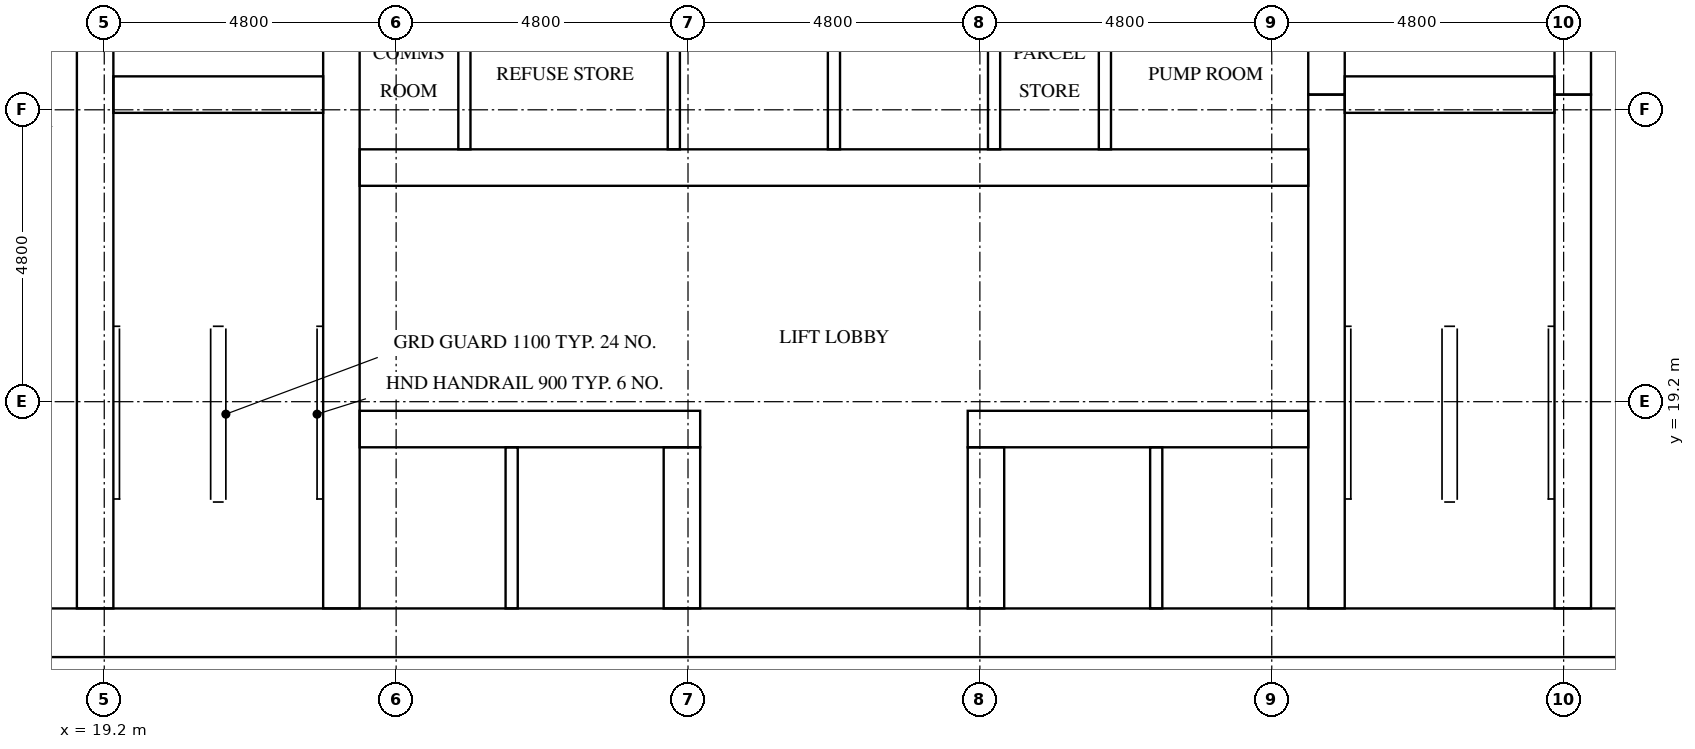
"""IFC4 building model, lengths in metres.
Left out: names, types, materials, properties, quantities, classifications, styles, units other than length and angle.
Written with IfcOpenShell. Run it as: python <this file> out.ifc"""

import sys

from ifc_helpers import new_model, si_unit, direction, frame, frame_2d, origin, place, context, subcontext, project, spatial, rectangle, extrude, element, fill, save


model = new_model("IFC4")
c1 = context("Model", 3, precision=1e-05, world=origin(), true_north=direction((0.0, 1.0)))
c2 = subcontext(c1, "Body", "Model", "MODEL_VIEW")
j1 = project(units=[si_unit("LENGTHUNIT", "METRE"), si_unit("PLANEANGLEUNIT", "RADIAN")], contexts=[c1])
p1 = place(None, origin())
s1 = spatial("IfcSite", under=j1, at=p1, CompositionType="ELEMENT")
p2 = place(p1, origin())
s2 = spatial("IfcBuilding", under=s1, at=p2, CompositionType="ELEMENT")
p3 = place(p2, frame((0.0, 0.0, 133.1)))
s3 = spatial("IfcBuildingStorey", under=s2, at=p3, CompositionType="ELEMENT", Elevation=133.1)
p4 = place(p3, frame((15.0, 15.4, 0.0), z_axis=(0.0, 0.0, 1.0), x_axis=(1.0, 0.0, 0.0)))
e1 = element("IfcWall", 1, at=p4, inside=s3, PredefinedType="SHEAR", context=c2, shape_type="SweptSolid", body=[
    extrude(rectangle(XDim=32.4, YDim=0.8, at=frame_2d((16.2, 0.0))), origin(), (0.0, 0.0, 1.0), 3.2),
])
p5 = place(p4, frame((15.3, 0.0, 0.0)))
e2 = element("IfcOpeningElement", 2, at=p5, cuts=e1, PredefinedType="OPENING", context=c2, shape_type="SweptSolid", body=[
    extrude(rectangle(XDim=1.8, YDim=2.1, at=frame_2d((0.9, 1.05))), frame((0.0, 0.41, 0.0), z_axis=(0.0, -1.0, 0.0), x_axis=(1.0, 0.0, 0.0)), (0.0, 0.0, 1.0), 0.82),
])
p6 = place(p3, frame((19.05, 15.8, 0.0), z_axis=(0.0, 0.0, 1.0), x_axis=(0.0, 1.0, 0.0)))
e3 = element("IfcWall", 3, at=p6, inside=s3, PredefinedType="SHEAR", context=c2, shape_type="SweptSolid", body=[
    extrude(rectangle(XDim=15.15, YDim=0.6, at=frame_2d((7.575, 0.0))), origin(), (0.0, 0.0, 1.0), 3.2),
])
p7 = place(p6, frame((9.65, 0.0, 0.0)))
e4 = element("IfcOpeningElement", 4, at=p7, cuts=e3, PredefinedType="OPENING", context=c2, shape_type="SweptSolid", body=[
    extrude(rectangle(XDim=1.1, YDim=2.1, at=frame_2d((0.55, 1.05))), frame((0.0, 0.31, 0.0), z_axis=(0.0, -1.0, 0.0), x_axis=(1.0, 0.0, 0.0)), (0.0, 0.0, 1.0), 0.62),
])
p8 = place(p6, frame((13.15, 0.0, 0.0)))
e5 = element("IfcOpeningElement", 5, at=p8, cuts=e3, PredefinedType="OPENING", context=c2, shape_type="SweptSolid", body=[
    extrude(rectangle(XDim=1.1, YDim=2.1, at=frame_2d((0.55, 1.05))), frame((0.0, 0.31, 0.0), z_axis=(0.0, -1.0, 0.0), x_axis=(1.0, 0.0, 0.0)), (0.0, 0.0, 1.0), 0.62),
])
p9 = place(p6, frame((0.4, 0.0, 0.0)))
e6 = element("IfcOpeningElement", 6, at=p9, cuts=e3, PredefinedType="OPENING", context=c2, shape_type="SweptSolid", body=[
    extrude(rectangle(XDim=1.2, YDim=2.1, at=frame_2d((0.6, 1.05))), frame((0.0, 0.31, 0.0), z_axis=(0.0, -1.0, 0.0), x_axis=(1.0, 0.0, 0.0)), (0.0, 0.0, 1.0), 0.62),
])
p10 = place(p3, frame((23.1, 15.8, 0.0), z_axis=(0.0, 0.0, 1.0), x_axis=(0.0, 1.0, 0.0)))
e7 = element("IfcWall", 7, at=p10, inside=s3, PredefinedType="SHEAR", context=c2, shape_type="SweptSolid", body=[
    extrude(rectangle(XDim=21.2, YDim=0.6, at=frame_2d((10.6, 0.0))), origin(), (0.0, 0.0, 1.0), 3.2),
])
p11 = place(p3, frame((39.3, 15.8, 0.0), z_axis=(0.0, 0.0, 1.0), x_axis=(0.0, 1.0, 0.0)))
e8 = element("IfcWall", 8, at=p11, inside=s3, PredefinedType="SHEAR", context=c2, shape_type="SweptSolid", body=[
    extrude(rectangle(XDim=8.45, YDim=0.6, at=frame_2d((4.225, 0.0))), origin(), (0.0, 0.0, 1.0), 3.2),
])
p12 = place(p3, frame((39.3, 24.25, 0.0), z_axis=(0.0, 0.0, 1.0), x_axis=(0.0, 1.0, 0.0)))
e9 = element("IfcWall", 9, at=p12, inside=s3, PredefinedType="SHEAR", context=c2, shape_type="SweptSolid", body=[
    extrude(rectangle(XDim=3.5, YDim=0.6, at=frame_2d((1.75, 0.0))), origin(), (0.0, 0.0, 1.0), 3.2),
])
p13 = place(p3, frame((43.35, 15.8, 0.0), z_axis=(0.0, 0.0, 1.0), x_axis=(0.0, 1.0, 0.0)))
e10 = element("IfcWall", 10, at=p13, inside=s3, PredefinedType="SHEAR", context=c2, shape_type="SweptSolid", body=[
    extrude(rectangle(XDim=8.45, YDim=0.6, at=frame_2d((4.225, 0.0))), origin(), (0.0, 0.0, 1.0), 3.2),
])
p14 = place(p13, frame((0.4, 0.0, 0.0)))
e11 = element("IfcOpeningElement", 11, at=p14, cuts=e10, PredefinedType="OPENING", context=c2, shape_type="SweptSolid", body=[
    extrude(rectangle(XDim=1.2, YDim=2.1, at=frame_2d((0.6, 1.05))), frame((0.0, 0.31, 0.0), z_axis=(0.0, -1.0, 0.0), x_axis=(1.0, 0.0, 0.0)), (0.0, 0.0, 1.0), 0.62),
])
p15 = place(p3, frame((43.35, 24.25, 0.0), z_axis=(0.0, 0.0, 1.0), x_axis=(0.0, 1.0, 0.0)))
e12 = element("IfcWall", 12, at=p15, inside=s3, PredefinedType="SHEAR", context=c2, shape_type="SweptSolid", body=[
    extrude(rectangle(XDim=3.5, YDim=0.6, at=frame_2d((1.75, 0.0))), origin(), (0.0, 0.0, 1.0), 3.2),
])
p16 = place(p15, frame((1.2, 0.0, 0.0)))
e13 = element("IfcOpeningElement", 13, at=p16, cuts=e12, PredefinedType="OPENING", context=c2, shape_type="SweptSolid", body=[
    extrude(rectangle(XDim=1.1, YDim=2.1, at=frame_2d((0.55, 1.05))), frame((0.0, 0.31, 0.0), z_axis=(0.0, -1.0, 0.0), x_axis=(1.0, 0.0, 0.0)), (0.0, 0.0, 1.0), 0.62),
])
for number, where, z_axis, x_axis in (
    (14, (19.35, 24.25, 0.0), (0.0, 0.0, 1.0), (1.0, 0.0, 0.0)),
    (15, (39.6, 24.25, 0.0), (0.0, 0.0, 1.0), (1.0, 0.0, 0.0)),
):
    element("IfcWall", number, at=place(p3, frame(where, z_axis=z_axis, x_axis=x_axis)), inside=s3, PredefinedType="SHEAR", context=c2, shape_type="SweptSolid", body=[
        extrude(rectangle(XDim=3.45, YDim=0.6, at=frame_2d((1.725, 0.0))), origin(), (0.0, 0.0, 1.0), 3.2),
    ])
p17 = place(p3, frame((23.4, 18.75, 0.0), z_axis=(0.0, 0.0, 1.0), x_axis=(1.0, 0.0, 0.0)))
e16 = element("IfcWall", 16, at=p17, inside=s3, PredefinedType="SHEAR", context=c2, shape_type="SweptSolid", body=[
    extrude(rectangle(XDim=5.6, YDim=0.6, at=frame_2d((2.8, 0.0))), origin(), (0.0, 0.0, 1.0), 3.2),
])
p18 = place(p17, frame((0.65, 0.0, 0.0)))
e17 = element("IfcOpeningElement", 17, at=p18, cuts=e16, PredefinedType="OPENING", context=c2, shape_type="SweptSolid", body=[
    extrude(rectangle(XDim=1.1, YDim=2.1, at=frame_2d((0.55, 1.05))), frame((0.0, 0.31, 0.0), z_axis=(0.0, -1.0, 0.0), x_axis=(1.0, 0.0, 0.0)), (0.0, 0.0, 1.0), 0.62),
])
p19 = place(p17, frame((3.25, 0.0, 0.0)))
e18 = element("IfcOpeningElement", 18, at=p19, cuts=e16, PredefinedType="OPENING", context=c2, shape_type="SweptSolid", body=[
    extrude(rectangle(XDim=1.1, YDim=2.1, at=frame_2d((0.55, 1.05))), frame((0.0, 0.31, 0.0), z_axis=(0.0, -1.0, 0.0), x_axis=(1.0, 0.0, 0.0)), (0.0, 0.0, 1.0), 0.62),
])
p20 = place(p3, frame((33.4, 18.75, 0.0), z_axis=(0.0, 0.0, 1.0), x_axis=(1.0, 0.0, 0.0)))
e19 = element("IfcWall", 19, at=p20, inside=s3, PredefinedType="SHEAR", context=c2, shape_type="SweptSolid", body=[
    extrude(rectangle(XDim=5.6, YDim=0.6, at=frame_2d((2.8, 0.0))), origin(), (0.0, 0.0, 1.0), 3.2),
])
p21 = place(p20, frame((1.25, 0.0, 0.0)))
e20 = element("IfcOpeningElement", 20, at=p21, cuts=e19, PredefinedType="OPENING", context=c2, shape_type="SweptSolid", body=[
    extrude(rectangle(XDim=1.1, YDim=2.1, at=frame_2d((0.55, 1.05))), frame((0.0, 0.31, 0.0), z_axis=(0.0, -1.0, 0.0), x_axis=(1.0, 0.0, 0.0)), (0.0, 0.0, 1.0), 0.62),
])
p22 = place(p20, frame((3.85, 0.0, 0.0)))
e21 = element("IfcOpeningElement", 21, at=p22, cuts=e19, PredefinedType="OPENING", context=c2, shape_type="SweptSolid", body=[
    extrude(rectangle(XDim=1.1, YDim=2.1, at=frame_2d((0.55, 1.05))), frame((0.0, 0.31, 0.0), z_axis=(0.0, -1.0, 0.0), x_axis=(1.0, 0.0, 0.0)), (0.0, 0.0, 1.0), 0.62),
])
p23 = place(p3, frame((23.4, 23.05, 0.0), z_axis=(0.0, 0.0, 1.0), x_axis=(1.0, 0.0, 0.0)))
e22 = element("IfcWall", 22, at=p23, inside=s3, PredefinedType="SHEAR", context=c2, shape_type="SweptSolid", body=[
    extrude(rectangle(XDim=15.6, YDim=0.6, at=frame_2d((7.8, 0.0))), origin(), (0.0, 0.0, 1.0), 3.2),
])
p24 = place(p23, frame((0.311, 0.0, 0.0)))
e23 = element("IfcOpeningElement", 23, at=p24, cuts=e22, PredefinedType="OPENING", context=c2, shape_type="SweptSolid", body=[
    extrude(rectangle(XDim=1.0, YDim=2.1, at=frame_2d((0.5, 1.05))), frame((0.0, 0.31, 0.0), z_axis=(0.0, -1.0, 0.0), x_axis=(1.0, 0.0, 0.0)), (0.0, 0.0, 1.0), 0.62),
])
p25 = place(p23, frame((2.945, 0.0, 0.0)))
e24 = element("IfcOpeningElement", 24, at=p25, cuts=e22, PredefinedType="OPENING", context=c2, shape_type="SweptSolid", body=[
    extrude(rectangle(XDim=1.0, YDim=2.1, at=frame_2d((0.5, 1.05))), frame((0.0, 0.31, 0.0), z_axis=(0.0, -1.0, 0.0), x_axis=(1.0, 0.0, 0.0)), (0.0, 0.0, 1.0), 0.62),
])
p26 = place(p23, frame((10.845, 0.0, 0.0)))
e25 = element("IfcOpeningElement", 25, at=p26, cuts=e22, PredefinedType="OPENING", context=c2, shape_type="SweptSolid", body=[
    extrude(rectangle(XDim=1.0, YDim=2.1, at=frame_2d((0.5, 1.05))), frame((0.0, 0.31, 0.0), z_axis=(0.0, -1.0, 0.0), x_axis=(1.0, 0.0, 0.0)), (0.0, 0.0, 1.0), 0.62),
])
p27 = place(p23, frame((13.478, 0.0, 0.0)))
e26 = element("IfcOpeningElement", 26, at=p27, cuts=e22, PredefinedType="OPENING", context=c2, shape_type="SweptSolid", body=[
    extrude(rectangle(XDim=1.0, YDim=2.1, at=frame_2d((0.5, 1.05))), frame((0.0, 0.31, 0.0), z_axis=(0.0, -1.0, 0.0), x_axis=(1.0, 0.0, 0.0)), (0.0, 0.0, 1.0), 0.62),
])
for number, where, z_axis, x_axis in (
    (27, (28.7, 15.8, 0.0), (0.0, 0.0, 1.0), (0.0, 1.0, 0.0)),
    (28, (33.7, 15.8, 0.0), (0.0, 0.0, 1.0), (0.0, 1.0, 0.0)),
):
    element("IfcWall", number, at=place(p3, frame(where, z_axis=z_axis, x_axis=x_axis)), inside=s3, PredefinedType="SHEAR", context=c2, shape_type="SweptSolid", body=[
        extrude(rectangle(XDim=2.65, YDim=0.6, at=frame_2d((1.325, 0.0))), origin(), (0.0, 0.0, 1.0), 3.2),
    ])
for number, where, z_axis, x_axis in (
    (29, (28.567, 23.35, 0.0), (0.0, 0.0, 1.0), (0.0, 1.0, 0.0)),
    (30, (31.2, 23.35, 0.0), (0.0, 0.0, 1.0), (0.0, 1.0, 0.0)),
    (31, (33.833, 23.35, 0.0), (0.0, 0.0, 1.0), (0.0, 1.0, 0.0)),
):
    element("IfcWall", number, at=place(p3, frame(where, z_axis=z_axis, x_axis=x_axis)), inside=s3, PredefinedType="SOLIDWALL", context=c2, shape_type="SweptSolid", body=[
        extrude(rectangle(XDim=2.5, YDim=0.2, at=frame_2d((1.25, 0.0))), origin(), (0.0, 0.0, 1.0), 3.2),
    ])
for number, where, z_axis, x_axis in (
    (32, (25.9, 15.8, 0.0), (0.0, 0.0, 1.0), (0.0, 1.0, 0.0)),
    (33, (36.5, 15.8, 0.0), (0.0, 0.0, 1.0), (0.0, 1.0, 0.0)),
):
    element("IfcWall", number, at=place(p3, frame(where, z_axis=z_axis, x_axis=x_axis)), inside=s3, PredefinedType="SOLIDWALL", context=c2, shape_type="SweptSolid", body=[
        extrude(rectangle(XDim=2.65, YDim=0.2, at=frame_2d((1.325, 0.0))), origin(), (0.0, 0.0, 1.0), 3.2),
    ])
for number, where, z_axis, x_axis in (
    (34, (25.123, 23.35, 0.0), (0.0, 0.0, 1.0), (0.0, 1.0, 0.0)),
    (35, (35.656, 23.35, 0.0), (0.0, 0.0, 1.0), (0.0, 1.0, 0.0)),
):
    element("IfcWall", number, at=place(p3, frame(where, z_axis=z_axis, x_axis=x_axis)), inside=s3, PredefinedType="PARTITIONING", context=c2, shape_type="SweptSolid", body=[
        extrude(rectangle(XDim=2.5, YDim=0.2, at=frame_2d((1.25, 0.0))), origin(), (0.0, 0.0, 1.0), 3.2),
    ])
p28 = place(p18, origin())
e36 = element("IfcDoor", 36, at=p28, inside=s3, OperationType="DOUBLE_DOOR_SLIDING", PredefinedType="DOOR", context=c2, shape_type="SweptSolid", body=[
    extrude(rectangle(XDim=1.1, YDim=2.1, at=frame_2d((0.55, 1.05))), frame((0.0, 0.025, 0.0), z_axis=(0.0, -1.0, 0.0), x_axis=(1.0, 0.0, 0.0)), (0.0, 0.0, 1.0), 0.05),
])
fill(e17, e36)
p29 = place(p19, origin())
e37 = element("IfcDoor", 37, at=p29, inside=s3, OperationType="DOUBLE_DOOR_SLIDING", PredefinedType="DOOR", context=c2, shape_type="SweptSolid", body=[
    extrude(rectangle(XDim=1.1, YDim=2.1, at=frame_2d((0.55, 1.05))), frame((0.0, 0.025, 0.0), z_axis=(0.0, -1.0, 0.0), x_axis=(1.0, 0.0, 0.0)), (0.0, 0.0, 1.0), 0.05),
])
fill(e18, e37)
p30 = place(p21, origin())
e38 = element("IfcDoor", 38, at=p30, inside=s3, OperationType="DOUBLE_DOOR_SLIDING", PredefinedType="DOOR", context=c2, shape_type="SweptSolid", body=[
    extrude(rectangle(XDim=1.1, YDim=2.1, at=frame_2d((0.55, 1.05))), frame((0.0, 0.025, 0.0), z_axis=(0.0, -1.0, 0.0), x_axis=(1.0, 0.0, 0.0)), (0.0, 0.0, 1.0), 0.05),
])
fill(e20, e38)
p31 = place(p22, origin())
e39 = element("IfcDoor", 39, at=p31, inside=s3, OperationType="DOUBLE_DOOR_SLIDING", PredefinedType="DOOR", context=c2, shape_type="SweptSolid", body=[
    extrude(rectangle(XDim=1.1, YDim=2.1, at=frame_2d((0.55, 1.05))), frame((0.0, 0.025, 0.0), z_axis=(0.0, -1.0, 0.0), x_axis=(1.0, 0.0, 0.0)), (0.0, 0.0, 1.0), 0.05),
])
fill(e21, e39)
p32 = place(p9, frame((1.2, 0.0, 0.0), z_axis=(0.0, 0.0, 1.0), x_axis=(-1.0, 0.0, 0.0)))
e40 = element("IfcDoor", 40, at=p32, inside=s3, OperationType="SINGLE_SWING_RIGHT", PredefinedType="DOOR", context=c2, shape_type="SweptSolid", body=[
    extrude(rectangle(XDim=1.2, YDim=2.1, at=frame_2d((0.6, 1.05))), frame((0.0, 0.025, 0.0), z_axis=(0.0, -1.0, 0.0), x_axis=(1.0, 0.0, 0.0)), (0.0, 0.0, 1.0), 0.05),
])
fill(e6, e40)
p33 = place(p14, origin())
e41 = element("IfcDoor", 41, at=p33, inside=s3, OperationType="SINGLE_SWING_LEFT", PredefinedType="DOOR", context=c2, shape_type="SweptSolid", body=[
    extrude(rectangle(XDim=1.2, YDim=2.1, at=frame_2d((0.6, 1.05))), frame((0.0, 0.025, 0.0), z_axis=(0.0, -1.0, 0.0), x_axis=(1.0, 0.0, 0.0)), (0.0, 0.0, 1.0), 0.05),
])
fill(e11, e41)
p34 = place(p5, frame((1.8, 0.0, 0.0), z_axis=(0.0, 0.0, 1.0), x_axis=(-1.0, 0.0, 0.0)))
e42 = element("IfcDoor", 42, at=p34, inside=s3, OperationType="DOUBLE_DOOR_SINGLE_SWING", PredefinedType="DOOR", context=c2, shape_type="SweptSolid", body=[
    extrude(rectangle(XDim=1.8, YDim=2.1, at=frame_2d((0.9, 1.05))), frame((0.0, 0.025, 0.0), z_axis=(0.0, -1.0, 0.0), x_axis=(1.0, 0.0, 0.0)), (0.0, 0.0, 1.0), 0.05),
])
fill(e2, e42)
p35 = place(p24, frame((1.0, 0.0, 0.0), z_axis=(0.0, 0.0, 1.0), x_axis=(-1.0, 0.0, 0.0)))
e43 = element("IfcDoor", 43, at=p35, inside=s3, OperationType="SINGLE_SWING_LEFT", PredefinedType="DOOR", context=c2, shape_type="SweptSolid", body=[
    extrude(rectangle(XDim=1.0, YDim=2.1, at=frame_2d((0.5, 1.05))), frame((0.0, 0.025, 0.0), z_axis=(0.0, -1.0, 0.0), x_axis=(1.0, 0.0, 0.0)), (0.0, 0.0, 1.0), 0.05),
])
fill(e23, e43)
p36 = place(p25, frame((1.0, 0.0, 0.0), z_axis=(0.0, 0.0, 1.0), x_axis=(-1.0, 0.0, 0.0)))
e44 = element("IfcDoor", 44, at=p36, inside=s3, OperationType="SINGLE_SWING_RIGHT", PredefinedType="DOOR", context=c2, shape_type="SweptSolid", body=[
    extrude(rectangle(XDim=1.0, YDim=2.1, at=frame_2d((0.5, 1.05))), frame((0.0, 0.025, 0.0), z_axis=(0.0, -1.0, 0.0), x_axis=(1.0, 0.0, 0.0)), (0.0, 0.0, 1.0), 0.05),
])
fill(e24, e44)
p37 = place(p26, frame((1.0, 0.0, 0.0), z_axis=(0.0, 0.0, 1.0), x_axis=(-1.0, 0.0, 0.0)))
e45 = element("IfcDoor", 45, at=p37, inside=s3, OperationType="SINGLE_SWING_LEFT", PredefinedType="DOOR", context=c2, shape_type="SweptSolid", body=[
    extrude(rectangle(XDim=1.0, YDim=2.1, at=frame_2d((0.5, 1.05))), frame((0.0, 0.025, 0.0), z_axis=(0.0, -1.0, 0.0), x_axis=(1.0, 0.0, 0.0)), (0.0, 0.0, 1.0), 0.05),
])
fill(e25, e45)
p38 = place(p27, frame((1.0, 0.0, 0.0), z_axis=(0.0, 0.0, 1.0), x_axis=(-1.0, 0.0, 0.0)))
e46 = element("IfcDoor", 46, at=p38, inside=s3, OperationType="SINGLE_SWING_RIGHT", PredefinedType="DOOR", context=c2, shape_type="SweptSolid", body=[
    extrude(rectangle(XDim=1.0, YDim=2.1, at=frame_2d((0.5, 1.05))), frame((0.0, 0.025, 0.0), z_axis=(0.0, -1.0, 0.0), x_axis=(1.0, 0.0, 0.0)), (0.0, 0.0, 1.0), 0.05),
])
fill(e26, e46)
save(model, sys.argv[1])
